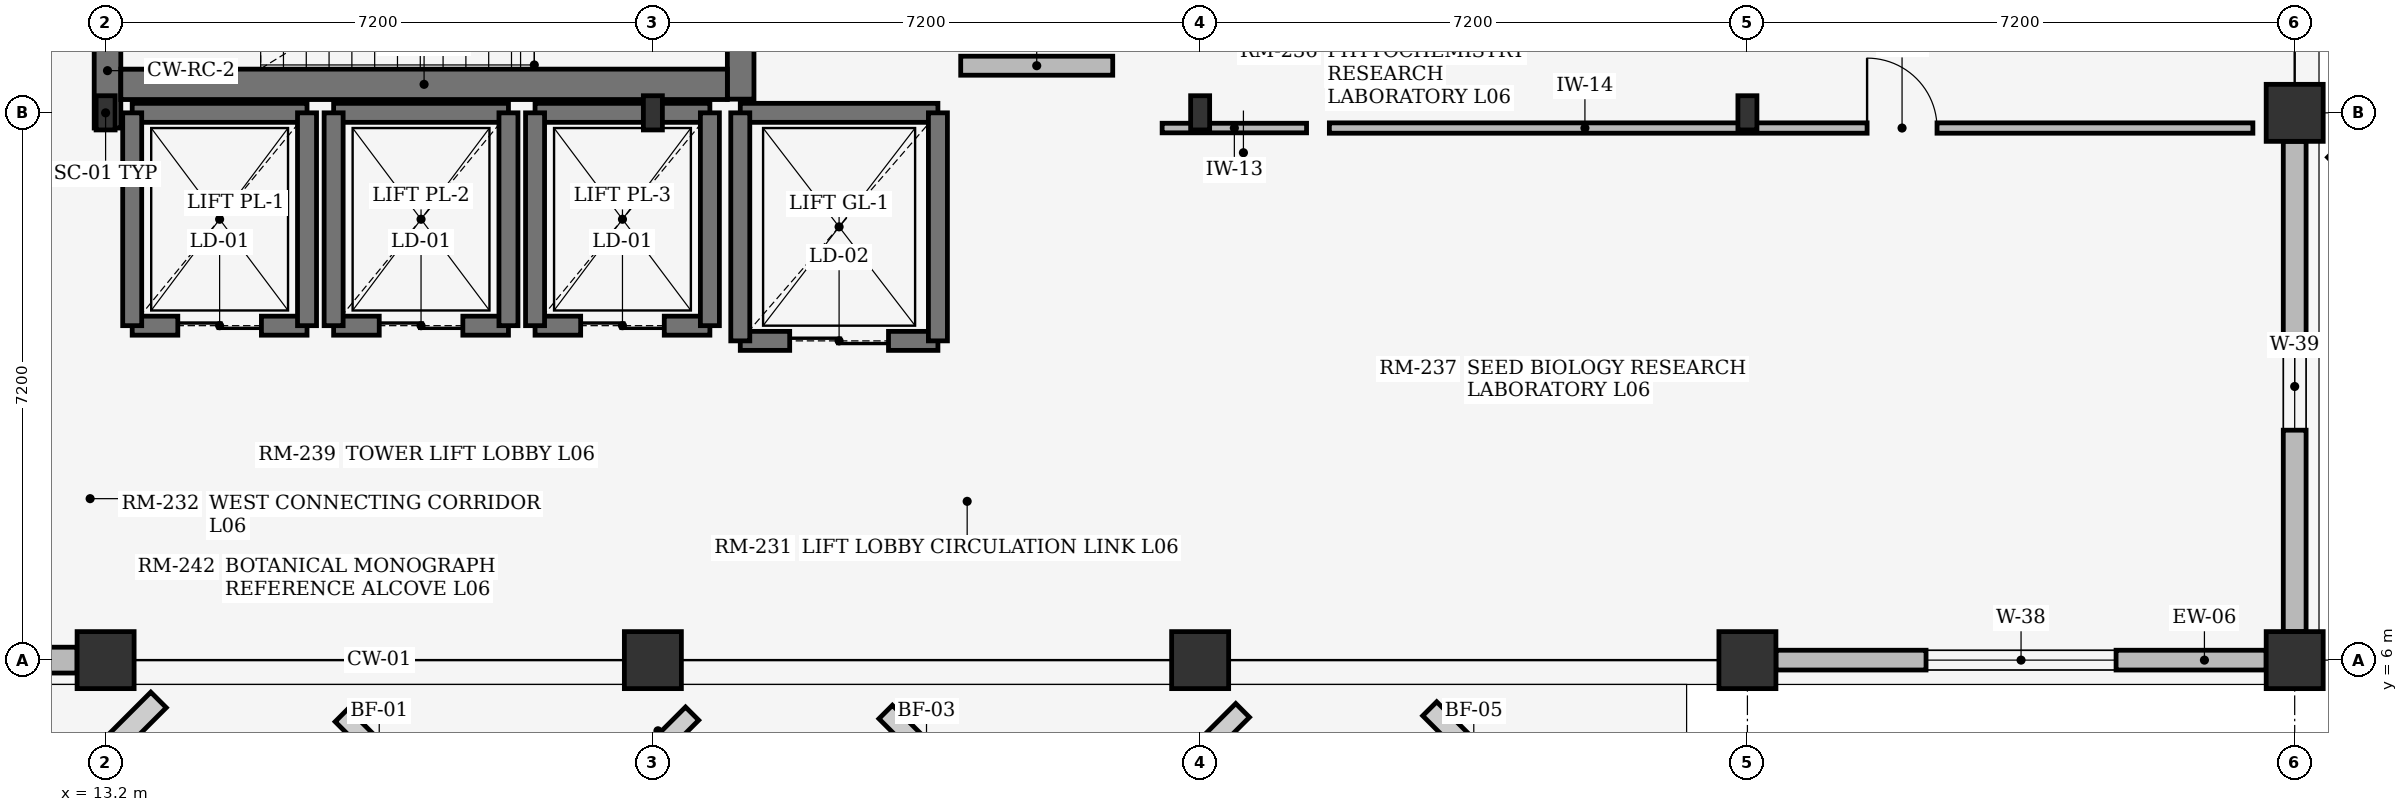
"""IFC4 building model, lengths in metres.
Left out: names, types, materials, properties, quantities, classifications, styles, units other than length and angle.
Written with IfcOpenShell. Run it as: python <this file> out.ifc"""

import sys

from ifc_helpers import new_model, si_unit, direction, frame, frame_2d, origin, origin_2d, place, context, subcontext, project, spatial, rectangle, i_section, extrude, element, fill, save


model = new_model("IFC4")
c1 = context("Model", 3, precision=1e-05, world=origin(), true_north=direction((0.0, 1.0)))
c2 = subcontext(c1, "Body", "Model", "MODEL_VIEW")
j1 = project(units=[si_unit("LENGTHUNIT", "METRE"), si_unit("PLANEANGLEUNIT", "RADIAN")], contexts=[c1])
p1 = place(None, origin())
s1 = spatial("IfcSite", under=j1, at=p1, CompositionType="ELEMENT")
p2 = place(p1, origin())
s2 = spatial("IfcBuilding", under=s1, at=p2, CompositionType="ELEMENT")
p3 = place(p2, frame((0.0, 0.0, 24.9)))
s3 = spatial("IfcBuildingStorey", under=s2, at=p3, CompositionType="ELEMENT", Elevation=24.9)
p4 = place(p3, frame((13.2, 6.0, 0.0), z_axis=(0.0, 0.0, 1.0), x_axis=(1.0, 0.0, 0.0)))
e1 = element("IfcColumn", 1, at=p4, inside=s3, PredefinedType="COLUMN", context=c2, shape_type="SweptSolid", body=[
    extrude(rectangle(XDim=0.75, YDim=0.75, at=origin_2d()), origin(), (0.0, 0.0, 1.0), 3.65),
])
p5 = place(p3, frame((13.2, 13.2, 0.0), z_axis=(0.0, 0.0, 1.0), x_axis=(1.0, 0.0, 0.0)))
e2 = element("IfcColumn", 2, at=p5, inside=s3, PredefinedType="COLUMN", context=c2, shape_type="SweptSolid", body=[
    extrude(i_section(OverallWidth=0.25, OverallDepth=0.45, WebThickness=0.011, FlangeThickness=0.014, at=origin_2d()), origin(), (0.0, 0.0, 1.0), 3.65),
])
p6 = place(p3, frame((20.4, 6.0, 0.0), z_axis=(0.0, 0.0, 1.0), x_axis=(1.0, 0.0, 0.0)))
e3 = element("IfcColumn", 3, at=p6, inside=s3, PredefinedType="COLUMN", context=c2, shape_type="SweptSolid", body=[
    extrude(rectangle(XDim=0.75, YDim=0.75, at=origin_2d()), origin(), (0.0, 0.0, 1.0), 3.65),
])
p7 = place(p3, frame((20.4, 13.2, 0.0), z_axis=(0.0, 0.0, 1.0), x_axis=(1.0, 0.0, 0.0)))
e4 = element("IfcColumn", 4, at=p7, inside=s3, PredefinedType="COLUMN", context=c2, shape_type="SweptSolid", body=[
    extrude(i_section(OverallWidth=0.25, OverallDepth=0.45, WebThickness=0.011, FlangeThickness=0.014, at=origin_2d()), origin(), (0.0, 0.0, 1.0), 3.65),
])
p8 = place(p3, frame((27.6, 6.0, 0.0), z_axis=(0.0, 0.0, 1.0), x_axis=(1.0, 0.0, 0.0)))
e5 = element("IfcColumn", 5, at=p8, inside=s3, PredefinedType="COLUMN", context=c2, shape_type="SweptSolid", body=[
    extrude(rectangle(XDim=0.75, YDim=0.75, at=origin_2d()), origin(), (0.0, 0.0, 1.0), 3.65),
])
p9 = place(p3, frame((27.6, 13.2, 0.0), z_axis=(0.0, 0.0, 1.0), x_axis=(1.0, 0.0, 0.0)))
e6 = element("IfcColumn", 6, at=p9, inside=s3, PredefinedType="COLUMN", context=c2, shape_type="SweptSolid", body=[
    extrude(i_section(OverallWidth=0.25, OverallDepth=0.45, WebThickness=0.011, FlangeThickness=0.014, at=origin_2d()), origin(), (0.0, 0.0, 1.0), 3.65),
])
p10 = place(p3, frame((34.8, 6.0, 0.0), z_axis=(0.0, 0.0, 1.0), x_axis=(1.0, 0.0, 0.0)))
e7 = element("IfcColumn", 7, at=p10, inside=s3, PredefinedType="COLUMN", context=c2, shape_type="SweptSolid", body=[
    extrude(rectangle(XDim=0.75, YDim=0.75, at=origin_2d()), origin(), (0.0, 0.0, 1.0), 3.65),
])
p11 = place(p3, frame((34.8, 13.2, 0.0), z_axis=(0.0, 0.0, 1.0), x_axis=(1.0, 0.0, 0.0)))
e8 = element("IfcColumn", 8, at=p11, inside=s3, PredefinedType="COLUMN", context=c2, shape_type="SweptSolid", body=[
    extrude(i_section(OverallWidth=0.25, OverallDepth=0.45, WebThickness=0.011, FlangeThickness=0.014, at=origin_2d()), origin(), (0.0, 0.0, 1.0), 3.65),
])
for number, where, z_axis, x_axis in (
    (9, (42.0, 6.0, 0.0), (0.0, 0.0, 1.0), (1.0, 0.0, 0.0)),
    (10, (42.0, 13.2, 0.0), (0.0, 0.0, 1.0), (1.0, 0.0, 0.0)),
):
    element("IfcColumn", number, at=place(p3, frame(where, z_axis=z_axis, x_axis=x_axis)), inside=s3, PredefinedType="COLUMN", context=c2, shape_type="SweptSolid", body=[
        extrude(rectangle(XDim=0.75, YDim=0.75, at=origin_2d()), origin(), (0.0, 0.0, 1.0), 3.65),
    ])
p12 = place(p3, frame((6.375, 6.0, 0.0), z_axis=(0.0, 0.0, 1.0), x_axis=(1.0, 0.0, 0.0)))
e11 = element("IfcWall", 11, at=p12, inside=s3, PredefinedType="STANDARD", context=c2, shape_type="SweptSolid", body=[
    extrude(rectangle(XDim=6.45, YDim=0.34, at=frame_2d((3.225, 0.0))), origin(), (0.0, 0.0, 1.0), 3.13),
])
p13 = place(p12, frame((2.375, 0.0, 0.75)))
e12 = element("IfcOpeningElement", 12, at=p13, cuts=e11, PredefinedType="OPENING", context=c2, shape_type="SweptSolid", body=[
    extrude(rectangle(XDim=1.7, YDim=1.35, at=frame_2d((0.85, 0.675))), frame((0.0, 0.18, 0.0), z_axis=(0.0, -1.0, 0.0), x_axis=(1.0, 0.0, 0.0)), (0.0, 0.0, 1.0), 0.36),
])
p14 = place(p3, frame((35.175, 6.0, 0.0), z_axis=(0.0, 0.0, 1.0), x_axis=(1.0, 0.0, 0.0)))
e13 = element("IfcWall", 13, at=p14, inside=s3, PredefinedType="STANDARD", context=c2, shape_type="SweptSolid", body=[
    extrude(rectangle(XDim=6.45, YDim=0.26, at=frame_2d((3.225, 0.0))), origin(), (0.0, 0.0, 1.0), 3.13),
])
p15 = place(p14, frame((1.975, 0.0, 0.75)))
e14 = element("IfcOpeningElement", 14, at=p15, cuts=e13, PredefinedType="OPENING", context=c2, shape_type="SweptSolid", body=[
    extrude(rectangle(XDim=2.5, YDim=1.35, at=frame_2d((1.25, 0.675))), frame((0.0, 0.14, 0.0), z_axis=(0.0, -1.0, 0.0), x_axis=(1.0, 0.0, 0.0)), (0.0, 0.0, 1.0), 0.28),
])
p16 = place(p3, frame((42.0, 6.375, 0.0), z_axis=(0.0, 0.0, 1.0), x_axis=(0.0, 1.0, 0.0)))
e15 = element("IfcWall", 15, at=p16, inside=s3, PredefinedType="STANDARD", context=c2, shape_type="SweptSolid", body=[
    extrude(rectangle(XDim=6.45, YDim=0.3, at=frame_2d((3.225, 0.0))), origin(), (0.0, 0.0, 1.0), 3.13),
])
p17 = place(p16, frame((2.65, 0.0, 0.75)))
e16 = element("IfcOpeningElement", 16, at=p17, cuts=e15, PredefinedType="OPENING", context=c2, shape_type="SweptSolid", body=[
    extrude(rectangle(XDim=1.15, YDim=1.5, at=frame_2d((0.575, 0.75))), frame((0.0, 0.16, 0.0), z_axis=(0.0, -1.0, 0.0), x_axis=(1.0, 0.0, 0.0)), (0.0, 0.0, 1.0), 0.32),
])
p18 = place(p3, frame((13.225, 13.0, 0.0), z_axis=(0.0, 0.0, 1.0), x_axis=(0.0, 1.0, 0.0)))
e17 = element("IfcWall", 17, at=p18, inside=s3, PredefinedType="SHEAR", context=c2, shape_type="SweptSolid", body=[
    extrude(rectangle(XDim=4.97, YDim=0.35, at=frame_2d((2.485, 0.0))), origin(), (0.0, 0.0, 1.0), 3.65),
])
p19 = place(p18, frame((1.86, 0.0, 0.0)))
e18 = element("IfcOpeningElement", 18, at=p19, cuts=e17, PredefinedType="OPENING", context=c2, shape_type="SweptSolid", body=[
    extrude(rectangle(XDim=1.25, YDim=2.2, at=frame_2d((0.625, 1.1))), frame((0.0, 0.185, 0.0), z_axis=(0.0, -1.0, 0.0), x_axis=(1.0, 0.0, 0.0)), (0.0, 0.0, 1.0), 0.37),
])
p20 = place(p3, frame((21.555, 13.38, 0.0), z_axis=(0.0, 0.0, 1.0), x_axis=(0.0, 1.0, 0.0)))
e19 = element("IfcWall", 19, at=p20, inside=s3, PredefinedType="SHEAR", context=c2, shape_type="SweptSolid", body=[
    extrude(rectangle(XDim=4.59, YDim=0.35, at=frame_2d((2.295, 0.0))), origin(), (0.0, 0.0, 1.0), 3.65),
])
p21 = place(p3, frame((13.4, 13.575, 0.0), z_axis=(0.0, 0.0, 1.0), x_axis=(1.0, 0.0, 0.0)))
e20 = element("IfcWall", 20, at=p21, inside=s3, PredefinedType="SHEAR", context=c2, shape_type="SweptSolid", body=[
    extrude(rectangle(XDim=7.98, YDim=0.4, at=frame_2d((3.99, 0.0))), origin(), (0.0, 0.0, 1.0), 3.65),
])
p22 = place(p3, frame((13.55, 10.4, 0.0), z_axis=(0.0, 0.0, 1.0), x_axis=(1.0, 0.0, 0.0)))
e21 = element("IfcWall", 21, at=p22, inside=s3, PredefinedType="SHEAR", context=c2, shape_type="SweptSolid", body=[
    extrude(rectangle(XDim=2.3, YDim=0.25, at=frame_2d((1.15, 0.0))), origin(), (0.0, 0.0, 1.0), 3.65),
])
p23 = place(p22, frame((0.6, 0.0, 0.0)))
e22 = element("IfcOpeningElement", 22, at=p23, cuts=e21, PredefinedType="OPENING", context=c2, shape_type="SweptSolid", body=[
    extrude(rectangle(XDim=1.1, YDim=2.2, at=frame_2d((0.55, 1.1))), frame((0.0, 0.135, 0.0), z_axis=(0.0, -1.0, 0.0), x_axis=(1.0, 0.0, 0.0)), (0.0, 0.0, 1.0), 0.27),
])
p24 = place(p3, frame((13.55, 13.2, 0.0), z_axis=(0.0, 0.0, 1.0), x_axis=(1.0, 0.0, 0.0)))
e23 = element("IfcWall", 23, at=p24, inside=s3, PredefinedType="SHEAR", context=c2, shape_type="SweptSolid", body=[
    extrude(rectangle(XDim=2.3, YDim=0.25, at=frame_2d((1.15, 0.0))), origin(), (0.0, 0.0, 1.0), 3.65),
])
for number, where, z_axis, x_axis in (
    (24, (13.55, 10.4, 0.0), (0.0, 0.0, 1.0), (0.0, 1.0, 0.0)),
    (25, (15.85, 10.4, 0.0), (0.0, 0.0, 1.0), (0.0, 1.0, 0.0)),
):
    element("IfcWall", number, at=place(p3, frame(where, z_axis=z_axis, x_axis=x_axis)), inside=s3, PredefinedType="SHEAR", context=c2, shape_type="SweptSolid", body=[
        extrude(rectangle(XDim=2.8, YDim=0.25, at=frame_2d((1.4, 0.0))), origin(), (0.0, 0.0, 1.0), 3.65),
    ])
p25 = place(p3, frame((16.2, 10.4, 0.0), z_axis=(0.0, 0.0, 1.0), x_axis=(1.0, 0.0, 0.0)))
e26 = element("IfcWall", 26, at=p25, inside=s3, PredefinedType="SHEAR", context=c2, shape_type="SweptSolid", body=[
    extrude(rectangle(XDim=2.3, YDim=0.25, at=frame_2d((1.15, 0.0))), origin(), (0.0, 0.0, 1.0), 3.65),
])
p26 = place(p25, frame((0.6, 0.0, 0.0)))
e27 = element("IfcOpeningElement", 27, at=p26, cuts=e26, PredefinedType="OPENING", context=c2, shape_type="SweptSolid", body=[
    extrude(rectangle(XDim=1.1, YDim=2.2, at=frame_2d((0.55, 1.1))), frame((0.0, 0.135, 0.0), z_axis=(0.0, -1.0, 0.0), x_axis=(1.0, 0.0, 0.0)), (0.0, 0.0, 1.0), 0.27),
])
p27 = place(p3, frame((16.2, 13.2, 0.0), z_axis=(0.0, 0.0, 1.0), x_axis=(1.0, 0.0, 0.0)))
e28 = element("IfcWall", 28, at=p27, inside=s3, PredefinedType="SHEAR", context=c2, shape_type="SweptSolid", body=[
    extrude(rectangle(XDim=2.3, YDim=0.25, at=frame_2d((1.15, 0.0))), origin(), (0.0, 0.0, 1.0), 3.65),
])
for number, where, z_axis, x_axis in (
    (29, (16.2, 10.4, 0.0), (0.0, 0.0, 1.0), (0.0, 1.0, 0.0)),
    (30, (18.5, 10.4, 0.0), (0.0, 0.0, 1.0), (0.0, 1.0, 0.0)),
):
    element("IfcWall", number, at=place(p3, frame(where, z_axis=z_axis, x_axis=x_axis)), inside=s3, PredefinedType="SHEAR", context=c2, shape_type="SweptSolid", body=[
        extrude(rectangle(XDim=2.8, YDim=0.25, at=frame_2d((1.4, 0.0))), origin(), (0.0, 0.0, 1.0), 3.65),
    ])
p28 = place(p3, frame((18.85, 10.4, 0.0), z_axis=(0.0, 0.0, 1.0), x_axis=(1.0, 0.0, 0.0)))
e31 = element("IfcWall", 31, at=p28, inside=s3, PredefinedType="SHEAR", context=c2, shape_type="SweptSolid", body=[
    extrude(rectangle(XDim=2.3, YDim=0.25, at=frame_2d((1.15, 0.0))), origin(), (0.0, 0.0, 1.0), 3.65),
])
p29 = place(p28, frame((0.6, 0.0, 0.0)))
e32 = element("IfcOpeningElement", 32, at=p29, cuts=e31, PredefinedType="OPENING", context=c2, shape_type="SweptSolid", body=[
    extrude(rectangle(XDim=1.1, YDim=2.2, at=frame_2d((0.55, 1.1))), frame((0.0, 0.135, 0.0), z_axis=(0.0, -1.0, 0.0), x_axis=(1.0, 0.0, 0.0)), (0.0, 0.0, 1.0), 0.27),
])
p30 = place(p3, frame((18.85, 13.2, 0.0), z_axis=(0.0, 0.0, 1.0), x_axis=(1.0, 0.0, 0.0)))
e33 = element("IfcWall", 33, at=p30, inside=s3, PredefinedType="SHEAR", context=c2, shape_type="SweptSolid", body=[
    extrude(rectangle(XDim=2.3, YDim=0.25, at=frame_2d((1.15, 0.0))), origin(), (0.0, 0.0, 1.0), 3.65),
])
for number, where, z_axis, x_axis in (
    (34, (18.85, 10.4, 0.0), (0.0, 0.0, 1.0), (0.0, 1.0, 0.0)),
    (35, (21.15, 10.4, 0.0), (0.0, 0.0, 1.0), (0.0, 1.0, 0.0)),
):
    element("IfcWall", number, at=place(p3, frame(where, z_axis=z_axis, x_axis=x_axis)), inside=s3, PredefinedType="SHEAR", context=c2, shape_type="SweptSolid", body=[
        extrude(rectangle(XDim=2.8, YDim=0.25, at=frame_2d((1.4, 0.0))), origin(), (0.0, 0.0, 1.0), 3.65),
    ])
p31 = place(p3, frame((21.55, 10.2, 0.0), z_axis=(0.0, 0.0, 1.0), x_axis=(1.0, 0.0, 0.0)))
e36 = element("IfcWall", 36, at=p31, inside=s3, PredefinedType="SHEAR", context=c2, shape_type="SweptSolid", body=[
    extrude(rectangle(XDim=2.6, YDim=0.25, at=frame_2d((1.3, 0.0))), origin(), (0.0, 0.0, 1.0), 3.65),
])
p32 = place(p31, frame((0.65, 0.0, 0.0)))
e37 = element("IfcOpeningElement", 37, at=p32, cuts=e36, PredefinedType="OPENING", context=c2, shape_type="SweptSolid", body=[
    extrude(rectangle(XDim=1.3, YDim=2.25, at=frame_2d((0.65, 1.125))), frame((0.0, 0.135, 0.0), z_axis=(0.0, -1.0, 0.0), x_axis=(1.0, 0.0, 0.0)), (0.0, 0.0, 1.0), 0.27),
])
p33 = place(p3, frame((21.55, 13.2, 0.0), z_axis=(0.0, 0.0, 1.0), x_axis=(1.0, 0.0, 0.0)))
e38 = element("IfcWall", 38, at=p33, inside=s3, PredefinedType="SHEAR", context=c2, shape_type="SweptSolid", body=[
    extrude(rectangle(XDim=2.6, YDim=0.25, at=frame_2d((1.3, 0.0))), origin(), (0.0, 0.0, 1.0), 3.65),
])
for number, where, z_axis, x_axis in (
    (39, (21.55, 10.2, 0.0), (0.0, 0.0, 1.0), (0.0, 1.0, 0.0)),
    (40, (24.15, 10.2, 0.0), (0.0, 0.0, 1.0), (0.0, 1.0, 0.0)),
):
    element("IfcWall", number, at=place(p3, frame(where, z_axis=z_axis, x_axis=x_axis)), inside=s3, PredefinedType="SHEAR", context=c2, shape_type="SweptSolid", body=[
        extrude(rectangle(XDim=3.0, YDim=0.25, at=frame_2d((1.5, 0.0))), origin(), (0.0, 0.0, 1.0), 3.65),
    ])
p34 = place(p3, frame((24.45, 13.82, 0.0), z_axis=(0.0, 0.0, 1.0), x_axis=(1.0, 0.0, 0.0)))
e41 = element("IfcWall", 41, at=p34, inside=s3, PredefinedType="SOLIDWALL", context=c2, shape_type="SweptSolid", body=[
    extrude(rectangle(XDim=2.0, YDim=0.25, at=frame_2d((1.0, 0.0))), origin(), (0.0, 0.0, 1.0), 3.63),
])
p35 = place(p3, frame((27.1, 13.0, 0.0), z_axis=(0.0, 0.0, 1.0), x_axis=(1.0, 0.0, 0.0)))
e42 = element("IfcWall", 42, at=p35, inside=s3, PredefinedType="PARTITIONING", context=c2, shape_type="SweptSolid", body=[
    extrude(rectangle(XDim=1.9, YDim=0.126, at=frame_2d((0.95, 0.0))), origin(), (0.0, 0.0, 1.0), 3.63),
])
p36 = place(p3, frame((29.3, 13.0, 0.0), z_axis=(0.0, 0.0, 1.0), x_axis=(1.0, 0.0, 0.0)))
e43 = element("IfcWall", 43, at=p36, inside=s3, PredefinedType="PARTITIONING", context=c2, shape_type="SweptSolid", body=[
    extrude(rectangle(XDim=12.15, YDim=0.136, at=frame_2d((6.075, 0.0))), origin(), (0.0, 0.0, 1.0), 3.63),
])
p37 = place(p36, frame((7.074, 0.0, 0.0)))
e44 = element("IfcOpeningElement", 44, at=p37, cuts=e43, PredefinedType="OPENING", context=c2, shape_type="SweptSolid", body=[
    extrude(rectangle(XDim=0.92, YDim=2.1, at=frame_2d((0.46, 1.05))), frame((0.0, 0.078, 0.0), z_axis=(0.0, -1.0, 0.0), x_axis=(1.0, 0.0, 0.0)), (0.0, 0.0, 1.0), 0.156),
])
p38 = place(p15, origin())
e45 = element("IfcWindow", 45, at=p38, inside=s3, PartitioningType="SINGLE_PANEL", PredefinedType="WINDOW", context=c2, shape_type="SweptSolid", body=[
    extrude(rectangle(XDim=2.5, YDim=1.35, at=frame_2d((1.25, 0.675))), frame((0.0, 0.03, 0.0), z_axis=(0.0, -1.0, 0.0), x_axis=(1.0, 0.0, 0.0)), (0.0, 0.0, 1.0), 0.06),
])
fill(e14, e45)
p39 = place(p17, origin())
e46 = element("IfcWindow", 46, at=p39, inside=s3, PartitioningType="SINGLE_PANEL", PredefinedType="WINDOW", context=c2, shape_type="SweptSolid", body=[
    extrude(rectangle(XDim=1.15, YDim=1.5, at=frame_2d((0.575, 0.75))), frame((0.0, 0.03, 0.0), z_axis=(0.0, -1.0, 0.0), x_axis=(1.0, 0.0, 0.0)), (0.0, 0.0, 1.0), 0.06),
])
fill(e16, e46)
p40 = place(p23, origin())
e47 = element("IfcDoor", 47, at=p40, inside=s3, OperationType="DOUBLE_DOOR_SLIDING", PredefinedType="DOOR", context=c2, shape_type="SweptSolid", body=[
    extrude(rectangle(XDim=1.1, YDim=2.2, at=frame_2d((0.55, 1.1))), frame((0.0, 0.025, 0.0), z_axis=(0.0, -1.0, 0.0), x_axis=(1.0, 0.0, 0.0)), (0.0, 0.0, 1.0), 0.05),
])
fill(e22, e47)
p41 = place(p26, origin())
e48 = element("IfcDoor", 48, at=p41, inside=s3, OperationType="DOUBLE_DOOR_SLIDING", PredefinedType="DOOR", context=c2, shape_type="SweptSolid", body=[
    extrude(rectangle(XDim=1.1, YDim=2.2, at=frame_2d((0.55, 1.1))), frame((0.0, 0.025, 0.0), z_axis=(0.0, -1.0, 0.0), x_axis=(1.0, 0.0, 0.0)), (0.0, 0.0, 1.0), 0.05),
])
fill(e27, e48)
p42 = place(p29, origin())
e49 = element("IfcDoor", 49, at=p42, inside=s3, OperationType="DOUBLE_DOOR_SLIDING", PredefinedType="DOOR", context=c2, shape_type="SweptSolid", body=[
    extrude(rectangle(XDim=1.1, YDim=2.2, at=frame_2d((0.55, 1.1))), frame((0.0, 0.025, 0.0), z_axis=(0.0, -1.0, 0.0), x_axis=(1.0, 0.0, 0.0)), (0.0, 0.0, 1.0), 0.05),
])
fill(e32, e49)
p43 = place(p32, origin())
e50 = element("IfcDoor", 50, at=p43, inside=s3, OperationType="DOUBLE_DOOR_SLIDING", PredefinedType="DOOR", context=c2, shape_type="SweptSolid", body=[
    extrude(rectangle(XDim=1.3, YDim=2.25, at=frame_2d((0.65, 1.125))), frame((0.0, 0.025, 0.0), z_axis=(0.0, -1.0, 0.0), x_axis=(1.0, 0.0, 0.0)), (0.0, 0.0, 1.0), 0.05),
])
fill(e37, e50)
p44 = place(p37, origin())
e51 = element("IfcDoor", 51, at=p44, inside=s3, OperationType="SINGLE_SWING_LEFT", PredefinedType="DOOR", context=c2, shape_type="SweptSolid", body=[
    extrude(rectangle(XDim=0.92, YDim=2.1, at=frame_2d((0.46, 1.05))), frame((0.0, 0.025, 0.0), z_axis=(0.0, -1.0, 0.0), x_axis=(1.0, 0.0, 0.0)), (0.0, 0.0, 1.0), 0.05),
])
fill(e44, e51)
save(model, sys.argv[1])
